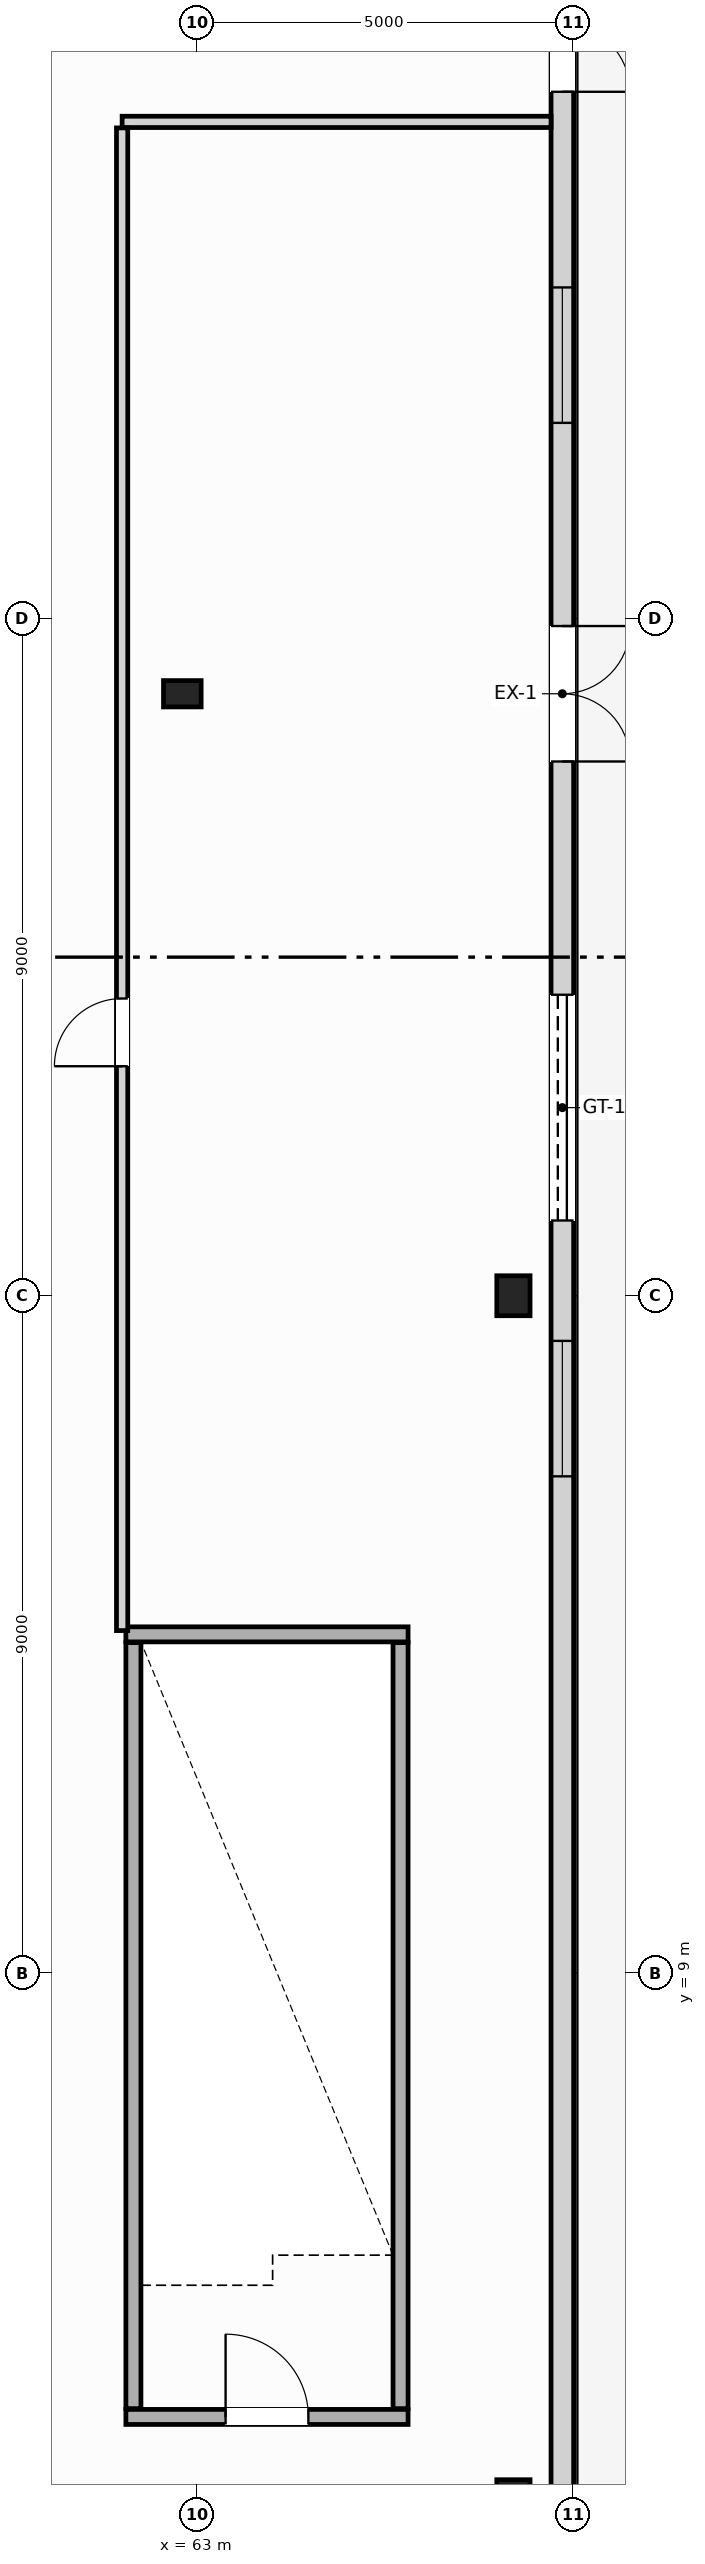
"""IFC4 building model, lengths in metres.
Left out: names, types, materials, properties, quantities, classifications, styles, units other than length and angle.
Written with IfcOpenShell. Run it as: python <this file> out.ifc"""

import sys

from ifc_helpers import new_model, si_unit, direction, frame, frame_2d, origin, origin_2d, place, context, subcontext, project, spatial, rectangle, i_section, extrude, source, transform, mapped, element, fill, save


model = new_model("IFC4")
c1 = context("Model", 3, precision=1e-05, world=origin(), true_north=direction((0.0, 1.0)))
c2 = subcontext(c1, "Body", "Model", "MODEL_VIEW")
j1 = project(units=[si_unit("LENGTHUNIT", "METRE"), si_unit("PLANEANGLEUNIT", "RADIAN")], contexts=[c1])
p1 = place(None, origin())
s1 = spatial("IfcSite", under=j1, at=p1, CompositionType="ELEMENT")
p2 = place(p1, origin())
s2 = spatial("IfcBuilding", under=s1, at=p2, CompositionType="ELEMENT")
p3 = place(p2, origin())
s3 = spatial("IfcBuildingStorey", under=s2, at=p3, CompositionType="ELEMENT", Elevation=0.0)
m1 = source(origin(), c2, "Body", "SweptSolid", [
    extrude(i_section(OverallWidth=0.442, OverallDepth=0.531, WebThickness=0.065, FlangeThickness=0.076, FilletRadius=0.015, at=origin_2d()), origin(), (0.0, 0.0, 1.0), 5.6),
])
for number, where, z_axis, x_axis in (
    (1, (67.2, 2.0, 0.0), (0.0, 0.0, 1.0), (1.0, 0.0, 0.0)),
    (2, (67.2, 18.0, 0.0), (0.0, 0.0, 1.0), (1.0, 0.0, 0.0)),
):
    element("IfcColumn", number, at=place(p3, frame(where, z_axis=z_axis, x_axis=x_axis)), inside=s3, PredefinedType="COLUMN", context=c2, shape_type="MappedRepresentation", body=[
        mapped(m1, transform((0.0, 0.0, 0.0), scale=1.0)),
    ])
m2 = source(origin(), c2, "Body", "SweptSolid", [
    extrude(rectangle(XDim=0.5, YDim=0.35, at=origin_2d()), origin(), (0.0, 0.0, 1.0), 5.32),
])
p4 = place(p3, frame((62.8, 26.0, 0.0), z_axis=(0.0, 0.0, 1.0), x_axis=(1.0, 0.0, 0.0)))
e3 = element("IfcColumn", 3, at=p4, inside=s3, PredefinedType="PILASTER", context=c2, shape_type="MappedRepresentation", body=[
    mapped(m2, transform((0.0, 0.0, 0.0), scale=1.0)),
])
p5 = place(p3, frame((67.85, 50.34, 0.0), z_axis=(0.0, 0.0, 1.0), x_axis=(0.0, -1.0, 0.0)))
e4 = element("IfcWall", 4, at=p5, inside=s3, PredefinedType="STANDARD", context=c2, shape_type="SweptSolid", body=[
    extrude(rectangle(XDim=48.68, YDim=0.3, at=frame_2d((24.34, 0.0))), origin(), (0.0, 0.0, 1.0), 5.32),
])
p6 = place(p5, frame((14.54, 0.0, 0.0)))
e5 = element("IfcOpeningElement", 5, at=p6, cuts=e4, PredefinedType="OPENING", context=c2, shape_type="SweptSolid", body=[
    extrude(rectangle(XDim=1.8, YDim=2.4, at=frame_2d((0.9, 1.2))), frame((0.0, 0.16, 0.0), z_axis=(0.0, -1.0, 0.0), x_axis=(1.0, 0.0, 0.0)), (0.0, 0.0, 1.0), 0.32),
])
p7 = place(p5, frame((23.44, 0.0, 0.0)))
e6 = element("IfcOpeningElement", 6, at=p7, cuts=e4, PredefinedType="OPENING", context=c2, shape_type="SweptSolid", body=[
    extrude(rectangle(XDim=1.8, YDim=2.4, at=frame_2d((0.9, 1.2))), frame((0.0, 0.16, 0.0), z_axis=(0.0, -1.0, 0.0), x_axis=(1.0, 0.0, 0.0)), (0.0, 0.0, 1.0), 0.32),
])
p8 = place(p5, frame((4.84, 0.0, 0.0)))
e7 = element("IfcOpeningElement", 7, at=p8, cuts=e4, PredefinedType="OPENING", context=c2, shape_type="SweptSolid", body=[
    extrude(rectangle(XDim=3.0, YDim=2.8, at=frame_2d((1.5, 1.4))), frame((0.0, 0.16, 0.0), z_axis=(0.0, -1.0, 0.0), x_axis=(1.0, 0.0, 0.0)), (0.0, 0.0, 1.0), 0.32),
])
p9 = place(p5, frame((28.34, 0.0, 0.0)))
e8 = element("IfcOpeningElement", 8, at=p9, cuts=e4, PredefinedType="OPENING", context=c2, shape_type="SweptSolid", body=[
    extrude(rectangle(XDim=3.0, YDim=2.8, at=frame_2d((1.5, 1.4))), frame((0.0, 0.16, 0.0), z_axis=(0.0, -1.0, 0.0), x_axis=(1.0, 0.0, 0.0)), (0.0, 0.0, 1.0), 0.32),
])
p10 = place(p5, frame((32.94, 0.0, 1.1)))
e9 = element("IfcOpeningElement", 9, at=p10, cuts=e4, PredefinedType="OPENING", context=c2, shape_type="SweptSolid", body=[
    extrude(rectangle(XDim=1.8, YDim=2.0, at=frame_2d((0.9, 1.0))), frame((0.0, 0.16, 0.0), z_axis=(0.0, -1.0, 0.0), x_axis=(1.0, 0.0, 0.0)), (0.0, 0.0, 1.0), 0.32),
])
p11 = place(p5, frame((18.94, 0.0, 1.1)))
e10 = element("IfcOpeningElement", 10, at=p11, cuts=e4, PredefinedType="OPENING", context=c2, shape_type="SweptSolid", body=[
    extrude(rectangle(XDim=1.8, YDim=2.0, at=frame_2d((0.9, 1.0))), frame((0.0, 0.16, 0.0), z_axis=(0.0, -1.0, 0.0), x_axis=(1.0, 0.0, 0.0)), (0.0, 0.0, 1.0), 0.32),
])
p12 = place(p5, frame((9.94, 0.0, 1.1)))
e11 = element("IfcOpeningElement", 11, at=p12, cuts=e4, PredefinedType="OPENING", context=c2, shape_type="SweptSolid", body=[
    extrude(rectangle(XDim=1.8, YDim=2.0, at=frame_2d((0.9, 1.0))), frame((0.0, 0.16, 0.0), z_axis=(0.0, -1.0, 0.0), x_axis=(1.0, 0.0, 0.0)), (0.0, 0.0, 1.0), 0.32),
])
p13 = place(p3, frame((62.05, 3.1, 0.0), z_axis=(0.0, 0.0, 1.0), x_axis=(1.0, 0.0, 0.0)))
e12 = element("IfcWall", 12, at=p13, inside=s3, PredefinedType="SOLIDWALL", context=c2, shape_type="SweptSolid", body=[
    extrude(rectangle(XDim=3.75, YDim=0.2, at=frame_2d((1.875, 0.0))), origin(), (0.0, 0.0, 1.0), 5.6),
])
p14 = place(p13, frame((1.325, 0.0, 0.0)))
e13 = element("IfcOpeningElement", 13, at=p14, cuts=e12, PredefinedType="OPENING", context=c2, shape_type="SweptSolid", body=[
    extrude(rectangle(XDim=1.1, YDim=2.15, at=frame_2d((0.55, 1.075))), frame((0.0, 0.11, 0.0), z_axis=(0.0, -1.0, 0.0), x_axis=(1.0, 0.0, 0.0)), (0.0, 0.0, 1.0), 0.22),
])
p15 = place(p3, frame((62.05, 13.5, 0.0), z_axis=(0.0, 0.0, 1.0), x_axis=(1.0, 0.0, 0.0)))
e14 = element("IfcWall", 14, at=p15, inside=s3, PredefinedType="SOLIDWALL", context=c2, shape_type="SweptSolid", body=[
    extrude(rectangle(XDim=3.75, YDim=0.2, at=frame_2d((1.875, 0.0))), origin(), (0.0, 0.0, 1.0), 5.6),
])
for number, where, z_axis, x_axis in (
    (15, (62.15, 3.21, 0.0), (0.0, 0.0, 1.0), (0.0, 1.0, 0.0)),
    (16, (65.7, 3.21, 0.0), (0.0, 0.0, 1.0), (0.0, 1.0, 0.0)),
):
    element("IfcWall", number, at=place(p3, frame(where, z_axis=z_axis, x_axis=x_axis)), inside=s3, PredefinedType="SOLIDWALL", context=c2, shape_type="SweptSolid", body=[
        extrude(rectangle(XDim=10.18, YDim=0.2, at=frame_2d((5.09, 0.0))), origin(), (0.0, 0.0, 1.0), 5.6),
    ])
p16 = place(p3, frame((62.0, 33.6, 0.0), z_axis=(0.0, 0.0, 1.0), x_axis=(1.0, 0.0, 0.0)))
e17 = element("IfcWall", 17, at=p16, inside=s3, PredefinedType="PARTITIONING", context=c2, shape_type="SweptSolid", body=[
    extrude(rectangle(XDim=5.7, YDim=0.15, at=frame_2d((2.85, 0.0))), origin(), (0.0, 0.0, 1.0), 5.32),
])
p17 = place(p3, frame((62.0, 13.55, 0.0), z_axis=(0.0, 0.0, 1.0), x_axis=(0.0, 1.0, 0.0)))
e18 = element("IfcWall", 18, at=p17, inside=s3, PredefinedType="PARTITIONING", context=c2, shape_type="SweptSolid", body=[
    extrude(rectangle(XDim=19.97, YDim=0.15, at=frame_2d((9.985, 0.0))), origin(), (0.0, 0.0, 1.0), 5.32),
])
p18 = place(p17, frame((7.5, 0.0, 0.0)))
e19 = element("IfcOpeningElement", 19, at=p18, cuts=e18, PredefinedType="OPENING", context=c2, shape_type="SweptSolid", body=[
    extrude(rectangle(XDim=0.9, YDim=2.15, at=frame_2d((0.45, 1.075))), frame((0.0, 0.085, 0.0), z_axis=(0.0, -1.0, 0.0), x_axis=(1.0, 0.0, 0.0)), (0.0, 0.0, 1.0), 0.17),
])
m3 = source(origin(), c2, "Body", "SweptSolid", [
    extrude(rectangle(XDim=1.8, YDim=2.4, at=frame_2d((0.9, 1.2))), frame((0.0, 0.025, 0.0), z_axis=(0.0, -1.0, 0.0), x_axis=(1.0, 0.0, 0.0)), (0.0, 0.0, 1.0), 0.05),
])
p19 = place(p6, origin())
e20 = element("IfcDoor", 20, at=p19, inside=s3, OperationType="DOUBLE_DOOR_SINGLE_SWING", PredefinedType="DOOR", context=c2, shape_type="MappedRepresentation", body=[
    mapped(m3, transform((0.0, 0.0, 0.0), scale=1.0)),
])
fill(e5, e20)
p20 = place(p7, origin())
e21 = element("IfcDoor", 21, at=p20, inside=s3, OperationType="DOUBLE_DOOR_SINGLE_SWING", PredefinedType="DOOR", context=c2, shape_type="MappedRepresentation", body=[
    mapped(m3, transform((0.0, 0.0, 0.0), scale=1.0)),
])
fill(e6, e21)
m4 = source(origin(), c2, "Body", "SweptSolid", [
    extrude(rectangle(XDim=3.0, YDim=2.8, at=frame_2d((1.5, 1.4))), frame((0.0, 0.025, 0.0), z_axis=(0.0, -1.0, 0.0), x_axis=(1.0, 0.0, 0.0)), (0.0, 0.0, 1.0), 0.05),
])
p21 = place(p9, origin())
e22 = element("IfcDoor", 22, at=p21, inside=s3, OperationType="ROLLINGUP", PredefinedType="GATE", context=c2, shape_type="MappedRepresentation", body=[
    mapped(m4, transform((0.0, 0.0, 0.0), scale=1.0)),
])
fill(e8, e22)
m5 = source(origin(), c2, "Body", "SweptSolid", [
    extrude(rectangle(XDim=1.8, YDim=2.0, at=frame_2d((0.9, 1.0))), frame((0.0, 0.03, 0.0), z_axis=(0.0, -1.0, 0.0), x_axis=(1.0, 0.0, 0.0)), (0.0, 0.0, 1.0), 0.06),
])
p22 = place(p10, origin())
e23 = element("IfcWindow", 23, at=p22, inside=s3, PartitioningType="SINGLE_PANEL", PredefinedType="WINDOW", context=c2, shape_type="MappedRepresentation", body=[
    mapped(m5, transform((0.0, 0.0, 0.0), scale=1.0)),
])
fill(e9, e23)
p23 = place(p11, origin())
e24 = element("IfcWindow", 24, at=p23, inside=s3, PartitioningType="SINGLE_PANEL", PredefinedType="WINDOW", context=c2, shape_type="MappedRepresentation", body=[
    mapped(m5, transform((0.0, 0.0, 0.0), scale=1.0)),
])
fill(e10, e24)
m6 = source(origin(), c2, "Body", "SweptSolid", [
    extrude(rectangle(XDim=1.1, YDim=2.15, at=frame_2d((0.55, 1.075))), frame((0.0, 0.025, 0.0), z_axis=(0.0, -1.0, 0.0), x_axis=(1.0, 0.0, 0.0)), (0.0, 0.0, 1.0), 0.05),
])
p24 = place(p14, origin())
e25 = element("IfcDoor", 25, at=p24, inside=s3, OperationType="SINGLE_SWING_RIGHT", PredefinedType="DOOR", context=c2, shape_type="MappedRepresentation", body=[
    mapped(m6, transform((0.0, 0.0, 0.0), scale=1.0)),
])
fill(e13, e25)
m7 = source(origin(), c2, "Body", "SweptSolid", [
    extrude(rectangle(XDim=0.9, YDim=2.15, at=frame_2d((0.45, 1.075))), frame((0.0, 0.025, 0.0), z_axis=(0.0, -1.0, 0.0), x_axis=(1.0, 0.0, 0.0)), (0.0, 0.0, 1.0), 0.05),
])
p25 = place(p18, origin())
e26 = element("IfcDoor", 26, at=p25, inside=s3, OperationType="SINGLE_SWING_RIGHT", PredefinedType="DOOR", context=c2, shape_type="MappedRepresentation", body=[
    mapped(m7, transform((0.0, 0.0, 0.0), scale=1.0)),
])
fill(e19, e26)
save(model, sys.argv[1])
